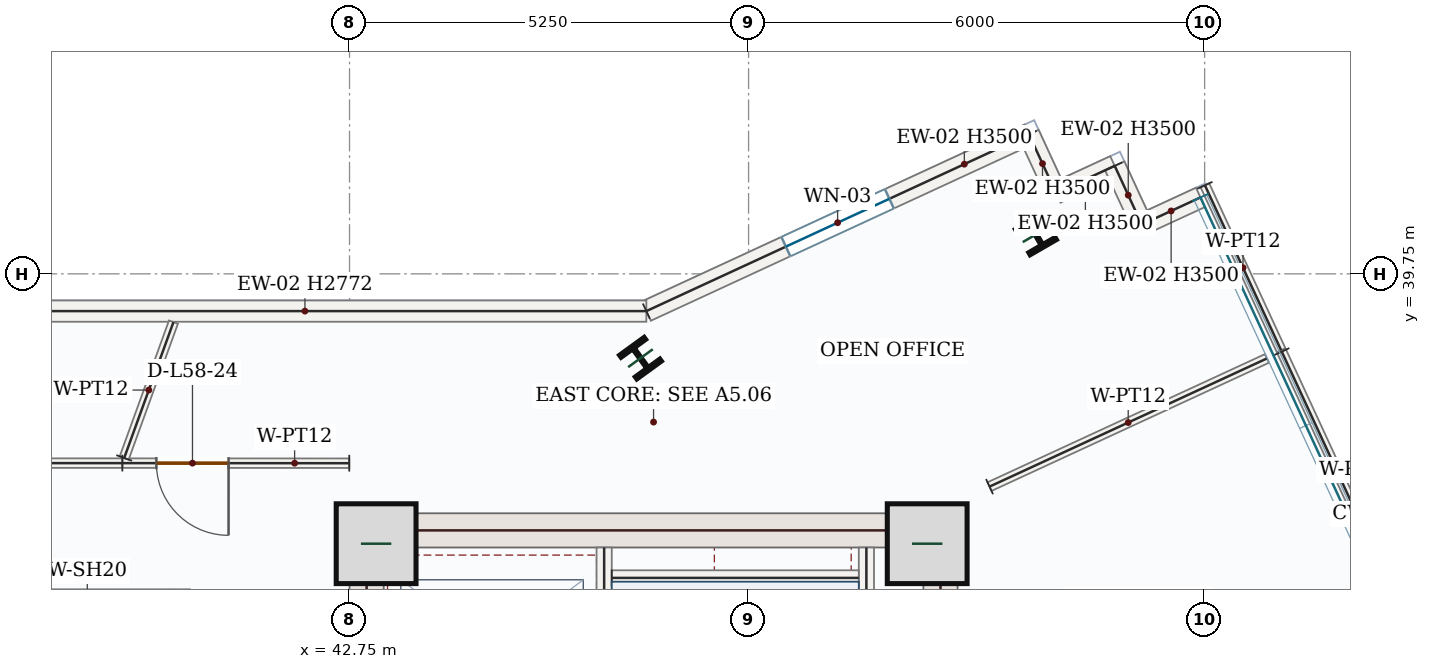
"""IFC4 building model, lengths in metres.
Left out: names, types, materials, properties, quantities, classifications, styles, units other than length and angle.
Written with IfcOpenShell. Run it as: python <this file> out.ifc"""

import sys

from ifc_helpers import new_model, si_unit, direction, frame, frame_2d, origin, origin_2d, place, context, subcontext, project, spatial, rectangle, i_section, extrude, source, transform, mapped, element, fill, save


model = new_model("IFC4")
c1 = context("Model", 3, precision=1e-05, world=origin(), true_north=direction((0.0, 1.0)))
c2 = subcontext(c1, "Body", "Model", "MODEL_VIEW")
j1 = project(units=[si_unit("LENGTHUNIT", "METRE"), si_unit("PLANEANGLEUNIT", "RADIAN")], contexts=[c1])
p1 = place(None, origin())
s1 = spatial("IfcSite", under=j1, at=p1, CompositionType="ELEMENT")
p2 = place(p1, origin())
s2 = spatial("IfcBuilding", under=s1, at=p2, CompositionType="ELEMENT")
p3 = place(p2, frame((0.0, 0.0, 246.6)))
s3 = spatial("IfcBuildingStorey", under=s2, at=p3, CompositionType="ELEMENT", Elevation=246.6)
p4 = place(p3, frame((42.975, 28.05, 0.0), z_axis=(0.0, 0.0, 1.0), x_axis=(0.0, 1.0, 0.0)))
e1 = element("IfcWall", 1, at=p4, inside=s3, PredefinedType="SHEAR", context=c2, shape_type="SweptSolid", body=[
    extrude(rectangle(XDim=8.55, YDim=0.45, at=frame_2d((4.275, 0.0))), origin(), (0.0, 0.0, 1.0), 3.5),
])
p5 = place(p4, frame((1.5, 0.0, 0.0)))
e2 = element("IfcOpeningElement", 2, at=p5, cuts=e1, PredefinedType="OPENING", context=c2, shape_type="SweptSolid", body=[
    extrude(rectangle(XDim=1.1, YDim=2.2, at=frame_2d((0.55, 1.1))), frame((0.0, 0.235, 0.0), z_axis=(0.0, -1.0, 0.0), x_axis=(1.0, 0.0, 0.0)), (0.0, 0.0, 1.0), 0.47),
])
m1 = source(origin(), c2, "Body", "SweptSolid", [
    extrude(rectangle(XDim=8.55, YDim=0.45, at=frame_2d((4.275, 0.0))), origin(), (0.0, 0.0, 1.0), 3.5),
])
p6 = place(p3, frame((50.525, 28.05, 0.0), z_axis=(0.0, 0.0, 1.0), x_axis=(0.0, 1.0, 0.0)))
e3 = element("IfcWall", 3, at=p6, inside=s3, PredefinedType="SHEAR", context=c2, shape_type="MappedRepresentation", body=[
    mapped(m1, transform((0.0, 0.0, 0.0), x_axis=(1.0, 0.0, 0.0), y_axis=(0.0, 1.0, 0.0), z_axis=(0.0, 0.0, 1.0), scale=1.0)),
])
m2 = source(origin(), c2, "Body", "SweptSolid", [
    extrude(rectangle(XDim=7.1, YDim=0.45, at=frame_2d((3.55, 0.0))), origin(), (0.0, 0.0, 1.0), 3.5),
])
p7 = place(p3, frame((43.2, 36.375, 0.0), z_axis=(0.0, 0.0, 1.0), x_axis=(1.0, 0.0, 0.0)))
e4 = element("IfcWall", 4, at=p7, inside=s3, PredefinedType="SHEAR", context=c2, shape_type="MappedRepresentation", body=[
    mapped(m2, transform((0.0, 0.0, 0.0), x_axis=(1.0, 0.0, 0.0), y_axis=(0.0, 1.0, 0.0), z_axis=(0.0, 0.0, 1.0), scale=1.0)),
])
m3 = source(origin(), c2, "Body", "SweptSolid", [
    extrude(rectangle(XDim=1.05, YDim=1.05, at=origin_2d()), origin(), (0.0, 0.0, 1.0), 3.75),
])
for number, where, z_axis, x_axis in (
    (5, (43.1, 36.2, 0.0), (0.0, 0.0, 1.0), (1.0, 0.0, 0.0)),
    (6, (50.35, 36.2, 0.0), (0.0, 0.0, 1.0), (1.0, 0.0, 0.0)),
):
    element("IfcColumn", number, at=place(p3, frame(where, z_axis=z_axis, x_axis=x_axis)), inside=s3, PredefinedType="COLUMN", context=c2, shape_type="MappedRepresentation", body=[
        mapped(m3, transform((0.0, 0.0, 0.0), x_axis=(1.0, 0.0, 0.0), y_axis=(0.0, 1.0, 0.0), z_axis=(0.0, 0.0, 1.0), scale=1.0)),
    ])
m4 = source(origin(), c2, "Body", "SweptSolid", [
    extrude(i_section(OverallWidth=0.399, OverallDepth=0.386, WebThickness=0.021, FlangeThickness=0.033, FilletRadius=0.018, at=origin_2d()), origin(), (0.0, 0.0, 1.0), 3.75),
])
for number, where, z_axis, x_axis in (
    (7, (46.578, 38.641, 0.0), (0.0, 0.0, 1.0), (0.809, 0.588, 0.0)),
    (8, (51.78, 40.268, 0.0), (0.0, 0.0, 1.0), (0.866, 0.5, 0.0)),
):
    element("IfcColumn", number, at=place(p3, frame(where, z_axis=z_axis, x_axis=x_axis)), inside=s3, PredefinedType="COLUMN", context=c2, shape_type="MappedRepresentation", body=[
        mapped(m4, transform((0.0, 0.0, 0.0), x_axis=(1.0, 0.0, 0.0), y_axis=(0.0, 1.0, 0.0), z_axis=(0.0, 0.0, 1.0), scale=1.0)),
    ])
p8 = place(p3, frame((46.655, 39.26, 0.0), z_axis=(0.0, 0.0, 1.0), x_axis=(0.907767275269, 0.419474163627, 0.0)))
e9 = element("IfcWall", 9, at=p8, inside=s3, PredefinedType="SOLIDWALL", context=c2, shape_type="SweptSolid", body=[
    extrude(rectangle(XDim=5.545, YDim=0.28, at=frame_2d((2.772, 0.0))), origin(), (0.0, 0.0, 1.0), 3.5),
])
p9 = place(p8, frame((2.022, 0.0, 0.85)))
e10 = element("IfcOpeningElement", 10, at=p9, cuts=e9, PredefinedType="OPENING", context=c2, shape_type="SweptSolid", body=[
    extrude(rectangle(XDim=1.5, YDim=1.5, at=frame_2d((0.75, 0.75))), frame((0.0, 0.15, 0.0), z_axis=(0.0, -1.0, 0.0), x_axis=(1.0, 0.0, 0.0)), (0.0, 0.0, 1.0), 0.3),
])
m5 = source(origin(), c2, "Body", "SweptSolid", [
    extrude(rectangle(XDim=0.85, YDim=0.28, at=frame_2d((0.425, 0.0))), origin(), (0.0, 0.0, 1.0), 3.5),
])
p10 = place(p3, frame((51.689, 41.586, 0.0), z_axis=(0.0, 0.0, 1.0), x_axis=(0.419549800563, -0.907732320041, 0.0)))
e11 = element("IfcWall", 11, at=p10, inside=s3, PredefinedType="SOLIDWALL", context=c2, shape_type="MappedRepresentation", body=[
    mapped(m5, transform((0.0, 0.0, 0.0), x_axis=(1.0, 0.0, 0.0), y_axis=(0.0, 1.0, 0.0), z_axis=(0.0, 0.0, 1.0), scale=1.0)),
])
m6 = source(origin(), c2, "Body", "SweptSolid", [
    extrude(rectangle(XDim=0.85, YDim=0.28, at=frame_2d((0.425, 0.0))), origin(), (0.0, 0.0, 1.0), 3.5),
])
p11 = place(p3, frame((52.045, 40.814, 0.0), z_axis=(0.0, 0.0, 1.0), x_axis=(0.907681752694, 0.41965919009, 0.0)))
e12 = element("IfcWall", 12, at=p11, inside=s3, PredefinedType="SOLIDWALL", context=c2, shape_type="MappedRepresentation", body=[
    mapped(m6, transform((0.0, 0.0, 0.0), x_axis=(1.0, 0.0, 0.0), y_axis=(0.0, 1.0, 0.0), z_axis=(0.0, 0.0, 1.0), scale=1.0)),
])
for number, where, z_axis, x_axis in (
    (13, (52.817, 41.171, 0.0), (0.0, 0.0, 1.0), (0.419, -0.908, 0.0)),
    (14, (53.173, 40.399, 0.0), (0.0, 0.0, 1.0), (0.908, 0.419, 0.0)),
):
    element("IfcWall", number, at=place(p3, frame(where, z_axis=z_axis, x_axis=x_axis)), inside=s3, PredefinedType="SOLIDWALL", context=c2, shape_type="MappedRepresentation", body=[
        mapped(m5, transform((0.0, 0.0, 0.0), x_axis=(1.0, 0.0, 0.0), y_axis=(0.0, 1.0, 0.0), z_axis=(0.0, 0.0, 1.0), scale=1.0)),
    ])
m7 = source(origin(), c2, "Body", "SweptSolid", [
    extrude(rectangle(XDim=8.984, YDim=0.28, at=frame_2d((4.492, 0.0))), origin(), (0.0, 0.0, 1.0), 2.772),
])
p12 = place(p3, frame((37.672, 39.26, 0.0), z_axis=(0.0, 0.0, 1.0), x_axis=(1.0, 0.0, 0.0)))
e15 = element("IfcWall", 15, at=p12, inside=s3, PredefinedType="SOLIDWALL", context=c2, shape_type="MappedRepresentation", body=[
    mapped(m7, transform((0.0, 0.0, 0.0), x_axis=(1.0, 0.0, 0.0), y_axis=(0.0, 1.0, 0.0), z_axis=(0.0, 0.0, 1.0), scale=1.0)),
])
m8 = source(origin(), c2, "Body", "SweptSolid", [
    extrude(rectangle(XDim=7.87, YDim=0.2, at=frame_2d((3.935, 0.0))), origin(), (0.0, 0.0, 1.0), 3.5),
])
p13 = place(p3, frame((49.55, 28.28, 0.0), z_axis=(0.0, 0.0, 1.0), x_axis=(0.0, 1.0, 0.0)))
e16 = element("IfcWall", 16, at=p13, inside=s3, PredefinedType="SOLIDWALL", context=c2, shape_type="MappedRepresentation", body=[
    mapped(m8, transform((0.0, 0.0, 0.0), x_axis=(1.0, 0.0, 0.0), y_axis=(0.0, 1.0, 0.0), z_axis=(0.0, 0.0, 1.0), scale=1.0)),
])
p14 = place(p3, frame((46.1, 28.15, 0.0), z_axis=(0.0, 0.0, 1.0), x_axis=(0.0, 1.0, 0.0)))
e17 = element("IfcWall", 17, at=p14, inside=s3, PredefinedType="SOLIDWALL", context=c2, shape_type="SweptSolid", body=[
    extrude(rectangle(XDim=8.0, YDim=0.2, at=frame_2d((4.0, 0.0))), origin(), (0.0, 0.0, 1.0), 3.5),
])
p15 = place(p14, frame((0.4, 0.0, 0.0)))
e18 = element("IfcOpeningElement", 18, at=p15, cuts=e17, PredefinedType="OPENING", context=c2, shape_type="SweptSolid", body=[
    extrude(rectangle(XDim=1.05, YDim=2.15, at=frame_2d((0.525, 1.075))), frame((0.0, 0.11, 0.0), z_axis=(0.0, -1.0, 0.0), x_axis=(1.0, 0.0, 0.0)), (0.0, 0.0, 1.0), 0.22),
])
m9 = source(origin(), c2, "Body", "SweptSolid", [
    extrude(rectangle(XDim=3.25, YDim=0.2, at=frame_2d((1.625, 0.0))), origin(), (0.0, 0.0, 1.0), 3.5),
])
p16 = place(p3, frame((46.2, 35.75, 0.0), z_axis=(0.0, 0.0, 1.0), x_axis=(1.0, 0.0, 0.0)))
e19 = element("IfcWall", 19, at=p16, inside=s3, PredefinedType="SOLIDWALL", context=c2, shape_type="MappedRepresentation", body=[
    mapped(m9, transform((0.0, 0.0, 0.0), x_axis=(1.0, 0.0, 0.0), y_axis=(0.0, 1.0, 0.0), z_axis=(0.0, 0.0, 1.0), scale=1.0)),
])
p17 = place(p3, frame((40.55, 33.2, 0.0), z_axis=(0.0, 0.0, 1.0), x_axis=(0.0, 1.0, 0.0)))
e20 = element("IfcWall", 20, at=p17, inside=s3, PredefinedType="SOLIDWALL", context=c2, shape_type="SweptSolid", body=[
    extrude(rectangle(XDim=2.4, YDim=0.2, at=frame_2d((1.2, 0.0))), origin(), (0.0, 0.0, 1.0), 3.5),
])
p18 = place(p17, frame((0.65, 0.0, 0.0)))
e21 = element("IfcOpeningElement", 21, at=p18, cuts=e20, PredefinedType="OPENING", context=c2, shape_type="SweptSolid", body=[
    extrude(rectangle(XDim=1.1, YDim=2.15, at=frame_2d((0.55, 1.075))), frame((0.0, 0.11, 0.0), z_axis=(0.0, -1.0, 0.0), x_axis=(1.0, 0.0, 0.0)), (0.0, 0.0, 1.0), 0.22),
])
m10 = source(origin(), c2, "Body", "SweptSolid", [
    extrude(rectangle(XDim=4.02, YDim=0.125, at=frame_2d((2.01, 0.0))), origin(), (0.0, 0.0, 1.0), 3.5),
])
p19 = place(p3, frame((51.17, 36.951, 0.0), z_axis=(0.0, 0.0, 1.0), x_axis=(0.907776222313, 0.419454801145, 0.0)))
e22 = element("IfcWall", 22, at=p19, inside=s3, PredefinedType="PARTITIONING", context=c2, shape_type="MappedRepresentation", body=[
    mapped(m10, transform((0.0, 0.0, 0.0), x_axis=(1.0, 0.0, 0.0), y_axis=(0.0, 1.0, 0.0), z_axis=(0.0, 0.0, 1.0), scale=1.0)),
])
m11 = source(origin(), c2, "Body", "SweptSolid", [
    extrude(rectangle(XDim=4.72, YDim=0.125, at=frame_2d((2.36, 0.0))), origin(), (0.0, 0.0, 1.0), 3.5),
])
p20 = place(p3, frame((55.015, 38.727, 0.0), z_axis=(0.0, 0.0, 1.0), x_axis=(0.419422223592, -0.907791274665, 0.0)))
e23 = element("IfcWall", 23, at=p20, inside=s3, PredefinedType="PARTITIONING", context=c2, shape_type="MappedRepresentation", body=[
    mapped(m11, transform((0.0, 0.0, 0.0), x_axis=(1.0, 0.0, 0.0), y_axis=(0.0, 1.0, 0.0), z_axis=(0.0, 0.0, 1.0), scale=1.0)),
])
p21 = place(p3, frame((42.747, 37.259, 0.0), z_axis=(0.0, 0.0, 1.0), x_axis=(-0.999999916415, 0.000408864141, 0.0)))
e24 = element("IfcWall", 24, at=p21, inside=s3, PredefinedType="PARTITIONING", context=c2, shape_type="SweptSolid", body=[
    extrude(rectangle(XDim=2.986, YDim=0.125, at=frame_2d((1.493, 0.0))), origin(), (0.0, 0.0, 1.0), 3.5),
])
p22 = place(p21, frame((1.588, 0.0, 0.0)))
e25 = element("IfcOpeningElement", 25, at=p22, cuts=e24, PredefinedType="OPENING", context=c2, shape_type="SweptSolid", body=[
    extrude(rectangle(XDim=0.95, YDim=2.15, at=frame_2d((0.475, 1.075))), frame((0.0, 0.073, 0.0), z_axis=(0.0, -1.0, 0.0), x_axis=(1.0, 0.0, 0.0)), (0.0, 0.0, 1.0), 0.145),
])
m12 = source(origin(), c2, "Body", "SweptSolid", [
    extrude(rectangle(XDim=1.901, YDim=0.125, at=frame_2d((0.951, 0.0))), origin(), (0.0, 0.0, 1.0), 3.5),
])
p23 = place(p3, frame((39.785, 37.327, 0.0), z_axis=(0.0, 0.0, 1.0), x_axis=(0.340887270823, 0.940104179648, 0.0)))
e26 = element("IfcWall", 26, at=p23, inside=s3, PredefinedType="PARTITIONING", context=c2, shape_type="MappedRepresentation", body=[
    mapped(m12, transform((0.0, 0.0, 0.0), x_axis=(1.0, 0.0, 0.0), y_axis=(0.0, 1.0, 0.0), z_axis=(0.0, 0.0, 1.0), scale=1.0)),
])
m13 = source(origin(), c2, "Body", "SweptSolid", [
    extrude(rectangle(XDim=2.39, YDim=0.125, at=frame_2d((1.195, 0.0))), origin(), (0.0, 0.0, 1.0), 3.5),
])
p24 = place(p3, frame((54.004, 40.915, 0.0), z_axis=(0.0, 0.0, 1.0), x_axis=(0.419459790898, -0.907773916688, 0.0)))
e27 = element("IfcWall", 27, at=p24, inside=s3, PredefinedType="PARTITIONING", context=c2, shape_type="MappedRepresentation", body=[
    mapped(m13, transform((0.0, 0.0, 0.0), x_axis=(1.0, 0.0, 0.0), y_axis=(0.0, 1.0, 0.0), z_axis=(0.0, 0.0, 1.0), scale=1.0)),
])
p25 = place(p3, frame((39.761, 37.26, 0.0), z_axis=(0.0, 0.0, 1.0), x_axis=(-1.0, 0.0, 0.0)))
e28 = element("IfcWall", 28, at=p25, inside=s3, PredefinedType="PARTITIONING", context=c2, shape_type="SweptSolid", body=[
    extrude(rectangle(XDim=6.221, YDim=0.125, at=frame_2d((3.111, 0.0))), origin(), (0.0, 0.0, 1.0), 3.5),
])
p26 = place(p25, frame((3.427, 0.0, 0.0)))
e29 = element("IfcOpeningElement", 29, at=p26, cuts=e28, PredefinedType="OPENING", context=c2, shape_type="SweptSolid", body=[
    extrude(rectangle(XDim=0.95, YDim=2.15, at=frame_2d((0.475, 1.075))), frame((0.0, 0.073, 0.0), z_axis=(0.0, -1.0, 0.0), x_axis=(1.0, 0.0, 0.0)), (0.0, 0.0, 1.0), 0.145),
])
m14 = source(origin(), c2, "Body", "SweptSolid", [
    extrude(rectangle(XDim=1.5, YDim=1.5, at=frame_2d((0.75, 0.75))), frame((0.0, 0.03, 0.0), z_axis=(0.0, -1.0, 0.0), x_axis=(1.0, 0.0, 0.0)), (0.0, 0.0, 1.0), 0.06),
])
p27 = place(p9, origin())
e30 = element("IfcWindow", 30, at=p27, inside=s3, PartitioningType="SINGLE_PANEL", PredefinedType="WINDOW", context=c2, shape_type="MappedRepresentation", body=[
    mapped(m14, transform((0.0, 0.0, 0.0), x_axis=(1.0, 0.0, 0.0), y_axis=(0.0, 1.0, 0.0), z_axis=(0.0, 0.0, 1.0), scale=1.0)),
])
fill(e10, e30)
m15 = source(origin(), c2, "Body", "SweptSolid", [
    extrude(rectangle(XDim=0.95, YDim=2.15, at=frame_2d((0.475, 1.075))), frame((0.0, 0.025, 0.0), z_axis=(0.0, -1.0, 0.0), x_axis=(1.0, 0.0, 0.0)), (0.0, 0.0, 1.0), 0.05),
])
p28 = place(p22, origin())
e31 = element("IfcDoor", 31, at=p28, inside=s3, OperationType="SINGLE_SWING_LEFT", PredefinedType="DOOR", context=c2, shape_type="MappedRepresentation", body=[
    mapped(m15, transform((0.0, 0.0, 0.0), x_axis=(1.0, 0.0, 0.0), y_axis=(0.0, 1.0, 0.0), z_axis=(0.0, 0.0, 1.0), scale=1.0)),
])
fill(e25, e31)
save(model, sys.argv[1])
